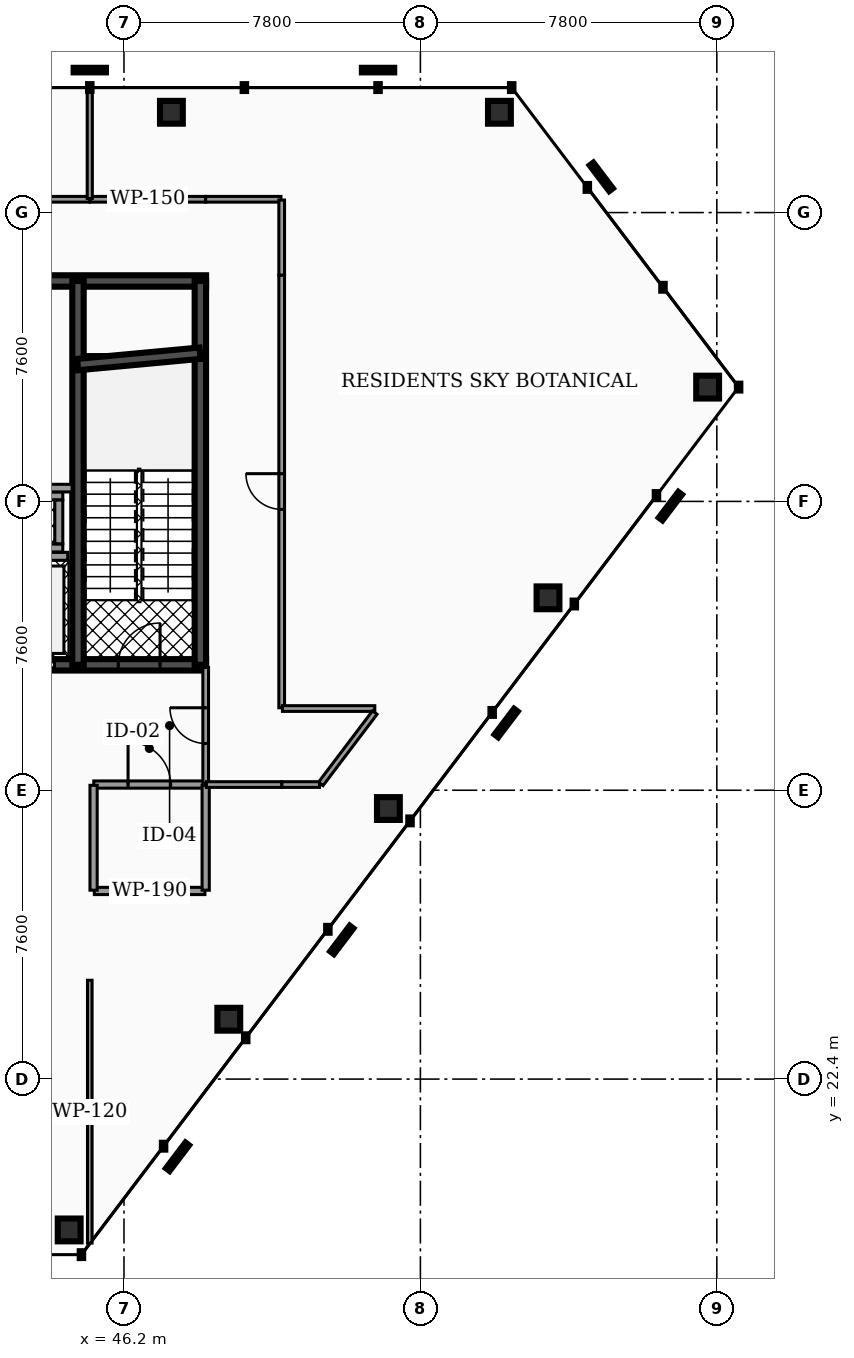
"""IFC4 building model, lengths in metres.
Left out: names, types, materials, properties, quantities, classifications, styles, units other than length and angle.
Written with IfcOpenShell. Run it as: python <this file> out.ifc"""

import sys

from ifc_helpers import new_model, si_unit, direction, frame, frame_2d, origin, origin_2d, place, context, subcontext, project, spatial, rectangle, hollow_rectangle, extrude, element, fill, save


model = new_model("IFC4")
c1 = context("Model", 3, precision=1e-05, world=origin(), true_north=direction((0.0, 1.0)))
c2 = subcontext(c1, "Body", "Model", "MODEL_VIEW")
j1 = project(units=[si_unit("LENGTHUNIT", "METRE"), si_unit("PLANEANGLEUNIT", "RADIAN")], contexts=[c1])
p1 = place(None, origin())
s1 = spatial("IfcSite", under=j1, at=p1, CompositionType="ELEMENT")
p2 = place(p1, origin())
s2 = spatial("IfcBuilding", under=s1, at=p2, CompositionType="ELEMENT")
p3 = place(p2, frame((0.0, 0.0, 204.34)))
s3 = spatial("IfcBuildingStorey", under=s2, at=p3, CompositionType="ELEMENT", Elevation=204.34)
p4 = place(p3, frame((28.5, 43.4, 0.0), z_axis=(0.0, 0.0, 1.0), x_axis=(1.0, 0.0, 0.0)))
e1 = element("IfcWall", 1, at=p4, inside=s3, PredefinedType="SHEAR", context=c2, shape_type="SweptSolid", body=[
    extrude(rectangle(XDim=19.86, YDim=0.3, at=frame_2d((9.93, 0.0))), origin(), (0.0, 0.0, 1.0), 4.2),
])
p5 = place(p3, frame((28.5, 33.3, 0.0), z_axis=(0.0, 0.0, 1.0), x_axis=(1.0, 0.0, 0.0)))
e2 = element("IfcWall", 2, at=p5, inside=s3, PredefinedType="SHEAR", context=c2, shape_type="SweptSolid", body=[
    extrude(rectangle(XDim=19.86, YDim=0.3, at=frame_2d((9.93, 0.0))), origin(), (0.0, 0.0, 1.0), 4.2),
])
p6 = place(p5, frame((3.93, 0.0, 0.0)))
e3 = element("IfcOpeningElement", 3, at=p6, cuts=e2, PredefinedType="OPENING", context=c2, shape_type="SweptSolid", body=[
    extrude(rectangle(XDim=1.1, YDim=2.15, at=frame_2d((0.55, 1.075))), frame((0.0, 0.16, 0.0), z_axis=(0.0, -1.0, 0.0), x_axis=(1.0, 0.0, 0.0)), (0.0, 0.0, 1.0), 0.32),
])
p7 = place(p5, frame((14.77, 0.0, 0.0)))
e4 = element("IfcOpeningElement", 4, at=p7, cuts=e2, PredefinedType="OPENING", context=c2, shape_type="SweptSolid", body=[
    extrude(rectangle(XDim=1.1, YDim=2.15, at=frame_2d((0.55, 1.075))), frame((0.0, 0.16, 0.0), z_axis=(0.0, -1.0, 0.0), x_axis=(1.0, 0.0, 0.0)), (0.0, 0.0, 1.0), 0.32),
])
p8 = place(p5, frame((11.25, 0.0, 0.0)))
e5 = element("IfcOpeningElement", 5, at=p8, cuts=e2, PredefinedType="OPENING", context=c2, shape_type="SweptSolid", body=[
    extrude(rectangle(XDim=1.0, YDim=2.1, at=frame_2d((0.5, 1.05))), frame((0.0, 0.16, 0.0), z_axis=(0.0, -1.0, 0.0), x_axis=(1.0, 0.0, 0.0)), (0.0, 0.0, 1.0), 0.32),
])
p9 = place(p5, frame((12.95, 0.0, 0.0)))
e6 = element("IfcOpeningElement", 6, at=p9, cuts=e2, PredefinedType="OPENING", context=c2, shape_type="SweptSolid", body=[
    extrude(rectangle(XDim=1.0, YDim=2.1, at=frame_2d((0.5, 1.05))), frame((0.0, 0.16, 0.0), z_axis=(0.0, -1.0, 0.0), x_axis=(1.0, 0.0, 0.0)), (0.0, 0.0, 1.0), 0.32),
])
p10 = place(p5, frame((5.85, 0.0, 0.0)))
e7 = element("IfcOpeningElement", 7, at=p10, cuts=e2, PredefinedType="OPENING", context=c2, shape_type="SweptSolid", body=[
    extrude(rectangle(XDim=1.0, YDim=2.1, at=frame_2d((0.5, 1.05))), frame((0.0, 0.16, 0.0), z_axis=(0.0, -1.0, 0.0), x_axis=(1.0, 0.0, 0.0)), (0.0, 0.0, 1.0), 0.32),
])
p11 = place(p5, frame((1.21, 0.0, 0.0)))
e8 = element("IfcOpeningElement", 8, at=p11, cuts=e2, PredefinedType="OPENING", context=c2, shape_type="SweptSolid", body=[
    extrude(rectangle(XDim=1.1, YDim=2.2, at=frame_2d((0.55, 1.1))), frame((0.0, 0.16, 0.0), z_axis=(0.0, -1.0, 0.0), x_axis=(1.0, 0.0, 0.0)), (0.0, 0.0, 1.0), 0.32),
])
p12 = place(p5, frame((9.34, 0.0, 0.0)))
e9 = element("IfcOpeningElement", 9, at=p12, cuts=e2, PredefinedType="OPENING", context=c2, shape_type="SweptSolid", body=[
    extrude(rectangle(XDim=1.12, YDim=2.05, at=frame_2d((0.56, 1.025))), frame((0.0, 0.16, 0.0), z_axis=(0.0, -1.0, 0.0), x_axis=(1.0, 0.0, 0.0)), (0.0, 0.0, 1.0), 0.32),
])
p13 = place(p5, frame((17.55, 0.0, 0.0)))
e10 = element("IfcOpeningElement", 10, at=p13, cuts=e2, PredefinedType="OPENING", context=c2, shape_type="SweptSolid", body=[
    extrude(rectangle(XDim=1.1, YDim=2.2, at=frame_2d((0.55, 1.1))), frame((0.0, 0.16, 0.0), z_axis=(0.0, -1.0, 0.0), x_axis=(1.0, 0.0, 0.0)), (0.0, 0.0, 1.0), 0.32),
])
for number, where, z_axis, x_axis in (
    (11, (44.99, 33.3, 0.0), (0.0, 0.0, 1.0), (0.0, 1.0, 0.0)),
    (12, (48.21, 33.3, 0.0), (0.0, 0.0, 1.0), (0.0, 1.0, 0.0)),
):
    element("IfcWall", number, at=place(p3, frame(where, z_axis=z_axis, x_axis=x_axis)), inside=s3, PredefinedType="SHEAR", context=c2, shape_type="SweptSolid", body=[
        extrude(rectangle(XDim=10.1, YDim=0.3, at=frame_2d((5.05, 0.0))), origin(), (0.0, 0.0, 1.0), 4.2),
    ])
p14 = place(p3, frame((44.98, 41.2, 0.0), z_axis=(0.0, 0.0, 1.0), x_axis=(0.995686468965, 0.09278176286, 0.0)))
e13 = element("IfcWall", 13, at=p14, inside=s3, PredefinedType="SHEAR", context=c2, shape_type="SweptSolid", body=[
    extrude(rectangle(XDim=3.234, YDim=0.3, at=frame_2d((1.617, 0.0))), origin(), (0.0, 0.0, 1.0), 4.2),
])
p15 = place(p3, frame((56.08, 47.839, 0.0), z_axis=(0.032993813129, -0.018588063734, 0.999282688823), x_axis=(0.490843733941, 0.871247627745, 0.0)))
e14 = element("IfcColumn", 14, at=p15, inside=s3, PredefinedType="COLUMN", context=c2, shape_type="SweptSolid", body=[
    extrude(hollow_rectangle(XDim=0.6, YDim=0.6, WallThickness=0.03, at=origin_2d()), origin(), (0.0, 0.0, 1.0), 4.203),
])
p16 = place(p3, frame((47.448, 47.839, 0.0), z_axis=(0.014760704561, -0.018596163226, 0.999718112427), x_axis=(0.783251064846, 0.621705532722, 0.0)))
e15 = element("IfcColumn", 15, at=p16, inside=s3, PredefinedType="COLUMN", context=c2, shape_type="SweptSolid", body=[
    extrude(hollow_rectangle(XDim=0.6, YDim=0.6, WallThickness=0.03, at=origin_2d()), origin(), (0.0, 0.0, 1.0), 4.201),
])
for number, where, z_axis, x_axis in (
    (16, (44.758, 18.431, 0.0), (-0.055, 0.031, 0.998), (-0.489, -0.872, 0.0)),
    (17, (48.958, 23.975, 0.0), (-0.049, 0.039, 0.998), (-0.627, -0.779, 0.0)),
):
    element("IfcColumn", number, at=place(p3, frame(where, z_axis=z_axis, x_axis=x_axis)), inside=s3, PredefinedType="COLUMN", context=c2, shape_type="SweptSolid", body=[
        extrude(hollow_rectangle(XDim=0.6, YDim=0.6, WallThickness=0.03, at=origin_2d()), origin(), (0.0, 0.0, 1.0), 4.208),
    ])
p17 = place(p3, frame((53.158, 29.519, 0.0), z_axis=(-0.042348426679, 0.047511454041, 0.997972581033), x_axis=(-0.746503429417, -0.665381567124, 0.0)))
e18 = element("IfcColumn", 18, at=p17, inside=s3, PredefinedType="COLUMN", context=c2, shape_type="SweptSolid", body=[
    extrude(hollow_rectangle(XDim=0.6, YDim=0.6, WallThickness=0.03, at=origin_2d()), origin(), (0.0, 0.0, 1.0), 4.208),
])
p18 = place(p3, frame((57.358, 35.063, 0.0), z_axis=(-0.03601854171, 0.055854840043, 0.997789006502), x_axis=(-0.840412048992, -0.541947956827, 0.0)))
e19 = element("IfcColumn", 19, at=p18, inside=s3, PredefinedType="COLUMN", context=c2, shape_type="SweptSolid", body=[
    extrude(hollow_rectangle(XDim=0.6, YDim=0.6, WallThickness=0.03, at=origin_2d()), origin(), (0.0, 0.0, 1.0), 4.209),
])
p19 = place(p3, frame((61.558, 40.607, 0.0), z_axis=(-0.029745662477, 0.064188008504, 0.99749440857), x_axis=(-0.907310606534, -0.420461012784, 0.0)))
e20 = element("IfcColumn", 20, at=p19, inside=s3, PredefinedType="COLUMN", context=c2, shape_type="SweptSolid", body=[
    extrude(hollow_rectangle(XDim=0.6, YDim=0.6, WallThickness=0.03, at=origin_2d()), origin(), (0.0, 0.0, 1.0), 4.21),
])
p20 = place(p3, frame((42.92, 36.155, 0.0), z_axis=(0.0, 0.0, 1.0), x_axis=(1.0, 0.0, 0.0)))
e21 = element("IfcWall", 21, at=p20, inside=s3, PredefinedType="SOLIDWALL", context=c2, shape_type="SweptSolid", body=[
    extrude(rectangle(XDim=1.8, YDim=0.21, at=frame_2d((0.9, 0.0))), origin(), (0.0, 0.0, 1.0), 3.172),
])
for number, where, z_axis, x_axis in (
    (22, (42.99, 36.375, 0.0), (0.0, 0.0, 1.0), (1.0, 0.0, 0.0)),
    (23, (42.99, 37.745, 0.0), (0.0, 0.0, 1.0), (1.0, 0.0, 0.0)),
):
    element("IfcWall", number, at=place(p3, frame(where, z_axis=z_axis, x_axis=x_axis)), inside=s3, PredefinedType="SOLIDWALL", context=c2, shape_type="SweptSolid", body=[
        extrude(rectangle(XDim=1.6, YDim=0.21, at=frame_2d((0.8, 0.0))), origin(), (0.0, 0.0, 1.0), 4.2),
    ])
p21 = place(p3, frame((44.485, 36.485, 0.0), z_axis=(0.0, 0.0, 1.0), x_axis=(0.0, 1.0, 0.0)))
e24 = element("IfcWall", 24, at=p21, inside=s3, PredefinedType="SOLIDWALL", context=c2, shape_type="SweptSolid", body=[
    extrude(rectangle(XDim=1.15, YDim=0.21, at=frame_2d((0.575, 0.0))), origin(), (0.0, 0.0, 1.0), 4.2),
])
p22 = place(p3, frame((41.22, 37.95, 0.0), z_axis=(0.0, 0.0, 1.0), x_axis=(1.0, 0.0, 0.0)))
e25 = element("IfcWall", 25, at=p22, inside=s3, PredefinedType="PARTITIONING", context=c2, shape_type="SweptSolid", body=[
    extrude(rectangle(XDim=3.615, YDim=0.2, at=frame_2d((1.808, 0.0))), origin(), (0.0, 0.0, 1.0), 3.157),
])
p23 = place(p3, frame((45.405, 30.15, 0.0), z_axis=(0.0, 0.0, 1.0), x_axis=(1.0, 0.0, 0.0)))
e26 = element("IfcWall", 26, at=p23, inside=s3, PredefinedType="PARTITIONING", context=c2, shape_type="SweptSolid", body=[
    extrude(rectangle(XDim=2.925, YDim=0.19, at=frame_2d((1.462, 0.0))), origin(), (0.0, 0.0, 1.0), 3.157),
])
p24 = place(p23, frame((0.903, 0.0, 0.0)))
e27 = element("IfcOpeningElement", 27, at=p24, cuts=e26, PredefinedType="OPENING", context=c2, shape_type="SweptSolid", body=[
    extrude(rectangle(XDim=1.12, YDim=2.05, at=frame_2d((0.56, 1.025))), frame((0.0, 0.105, 0.0), z_axis=(0.0, -1.0, 0.0), x_axis=(1.0, 0.0, 0.0)), (0.0, 0.0, 1.0), 0.21),
])
p25 = place(p3, frame((48.35, 30.17, 0.0), z_axis=(0.0, 0.0, 1.0), x_axis=(0.0, 1.0, 0.0)))
e28 = element("IfcWall", 28, at=p25, inside=s3, PredefinedType="PARTITIONING", context=c2, shape_type="SweptSolid", body=[
    extrude(rectangle(XDim=3.06, YDim=0.15, at=frame_2d((1.53, 0.0))), origin(), (0.0, 0.0, 1.0), 3.157),
])
p26 = place(p25, frame((1.06, 0.0, 0.0)))
e29 = element("IfcOpeningElement", 29, at=p26, cuts=e28, PredefinedType="OPENING", context=c2, shape_type="SweptSolid", body=[
    extrude(rectangle(XDim=0.94, YDim=2.05, at=frame_2d((0.47, 1.025))), frame((0.0, 0.085, 0.0), z_axis=(0.0, -1.0, 0.0), x_axis=(1.0, 0.0, 0.0)), (0.0, 0.0, 1.0), 0.17),
])
p27 = place(p3, frame((45.42, 27.35, 0.0), z_axis=(0.0, 0.0, 1.0), x_axis=(1.0, 0.0, 0.0)))
e30 = element("IfcWall", 30, at=p27, inside=s3, PredefinedType="PARTITIONING", context=c2, shape_type="SweptSolid", body=[
    extrude(rectangle(XDim=2.91, YDim=0.19, at=frame_2d((1.455, 0.0))), origin(), (0.0, 0.0, 1.0), 3.157),
])
for number, where, z_axis, x_axis in (
    (31, (45.4, 27.37, 0.0), (0.0, 0.0, 1.0), (0.0, 1.0, 0.0)),
    (32, (48.35, 27.37, 0.0), (0.0, 0.0, 1.0), (0.0, 1.0, 0.0)),
):
    element("IfcWall", number, at=place(p3, frame(where, z_axis=z_axis, x_axis=x_axis)), inside=s3, PredefinedType="PARTITIONING", context=c2, shape_type="SweptSolid", body=[
        extrude(rectangle(XDim=2.76, YDim=0.19, at=frame_2d((1.38, 0.0))), origin(), (0.0, 0.0, 1.0), 3.157),
    ])
p28 = place(p3, frame((45.305, 45.55, 0.0), z_axis=(0.0, 0.0, 1.0), x_axis=(1.0, 0.0, 0.0)))
e33 = element("IfcWall", 33, at=p28, inside=s3, PredefinedType="PARTITIONING", context=c2, shape_type="SweptSolid", body=[
    extrude(rectangle(XDim=3.045, YDim=0.15, at=frame_2d((1.522, 0.0))), origin(), (0.0, 0.0, 1.0), 3.157),
])
for number, where, z_axis, x_axis in (
    (34, (48.35, 45.55, 0.0), (0.0, 0.0, 1.0), (1.0, 0.0, 0.0)),
    (35, (50.35, 43.55, 0.0), (0.0, 0.0, 1.0), (0.0, 1.0, 0.0)),
):
    element("IfcWall", number, at=place(p3, frame(where, z_axis=z_axis, x_axis=x_axis)), inside=s3, PredefinedType="PARTITIONING", context=c2, shape_type="SweptSolid", body=[
        extrude(rectangle(XDim=1.98, YDim=0.15, at=frame_2d((0.99, 0.0))), origin(), (0.0, 0.0, 1.0), 3.157),
    ])
p29 = place(p3, frame((50.35, 32.17, 0.0), z_axis=(0.0, 0.0, 1.0), x_axis=(0.0, 1.0, 0.0)))
e36 = element("IfcWall", 36, at=p29, inside=s3, PredefinedType="PARTITIONING", context=c2, shape_type="SweptSolid", body=[
    extrude(rectangle(XDim=11.38, YDim=0.15, at=frame_2d((5.69, 0.0))), origin(), (0.0, 0.0, 1.0), 3.157),
])
p30 = place(p29, frame((5.22, 0.0, 0.0)))
e37 = element("IfcOpeningElement", 37, at=p30, cuts=e36, PredefinedType="OPENING", context=c2, shape_type="SweptSolid", body=[
    extrude(rectangle(XDim=0.94, YDim=2.05, at=frame_2d((0.47, 1.025))), frame((0.0, 0.085, 0.0), z_axis=(0.0, -1.0, 0.0), x_axis=(1.0, 0.0, 0.0)), (0.0, 0.0, 1.0), 0.17),
])
p31 = place(p3, frame((50.37, 32.15, 0.0), z_axis=(0.0, 0.0, 1.0), x_axis=(1.0, 0.0, 0.0)))
e38 = element("IfcWall", 38, at=p31, inside=s3, PredefinedType="PARTITIONING", context=c2, shape_type="SweptSolid", body=[
    extrude(rectangle(XDim=2.43, YDim=0.15, at=frame_2d((1.215, 0.0))), origin(), (0.0, 0.0, 1.0), 3.157),
])
p32 = place(p3, frame((51.377, 30.166, 0.0), z_axis=(0.0, 0.0, 1.0), x_axis=(0.603855693114, 0.797093659424, 0.0)))
e39 = element("IfcWall", 39, at=p32, inside=s3, PredefinedType="PARTITIONING", context=c2, shape_type="SweptSolid", body=[
    extrude(rectangle(XDim=2.356, YDim=0.15, at=frame_2d((1.178, 0.0))), origin(), (0.0, 0.0, 1.0), 3.157),
])
p33 = place(p3, frame((50.35, 30.15, 0.0), z_axis=(0.0, 0.0, 1.0), x_axis=(1.0, 0.0, 0.0)))
e40 = element("IfcWall", 40, at=p33, inside=s3, PredefinedType="PARTITIONING", context=c2, shape_type="SweptSolid", body=[
    extrude(rectangle(XDim=0.995, YDim=0.15, at=frame_2d((0.498, 0.0))), origin(), (0.0, 0.0, 1.0), 3.157),
])
p34 = place(p3, frame((48.37, 30.15, 0.0), z_axis=(0.0, 0.0, 1.0), x_axis=(1.0, 0.0, 0.0)))
e41 = element("IfcWall", 41, at=p34, inside=s3, PredefinedType="PARTITIONING", context=c2, shape_type="SweptSolid", body=[
    extrude(rectangle(XDim=1.98, YDim=0.15, at=frame_2d((0.99, 0.0))), origin(), (0.0, 0.0, 1.0), 3.157),
])
p35 = place(p3, frame((37.384, 45.55, 0.0), z_axis=(0.0, 0.0, 1.0), x_axis=(1.0, 0.0, 0.0)))
e42 = element("IfcWall", 42, at=p35, inside=s3, PredefinedType="PARTITIONING", context=c2, shape_type="SweptSolid", body=[
    extrude(rectangle(XDim=7.911, YDim=0.15, at=frame_2d((3.956, 0.0))), origin(), (0.0, 0.0, 1.0), 3.157),
])
p36 = place(p3, frame((45.3, 18.085, 0.0), z_axis=(0.0, 0.0, 1.0), x_axis=(0.0, 1.0, 0.0)))
e43 = element("IfcWall", 43, at=p36, inside=s3, PredefinedType="PARTITIONING", context=c2, shape_type="SweptSolid", body=[
    extrude(rectangle(XDim=6.915, YDim=0.12, at=frame_2d((3.458, 0.0))), origin(), (0.0, 0.0, 1.0), 3.157),
])
p37 = place(p3, frame((45.3, 45.57, 0.0), z_axis=(0.0, 0.0, 1.0), x_axis=(0.0, 1.0, 0.0)))
e44 = element("IfcWall", 44, at=p37, inside=s3, PredefinedType="PARTITIONING", context=c2, shape_type="SweptSolid", body=[
    extrude(rectangle(XDim=2.904, YDim=0.135, at=frame_2d((1.452, 0.0))), origin(), (0.0, 0.0, 1.0), 3.157),
])
p38 = place(p7, origin())
e45 = element("IfcDoor", 45, at=p38, inside=s3, OperationType="SLIDING_TO_RIGHT", PredefinedType="DOOR", context=c2, shape_type="SweptSolid", body=[
    extrude(rectangle(XDim=1.1, YDim=2.15, at=frame_2d((0.55, 1.075))), frame((0.0, 0.025, 0.0), z_axis=(0.0, -1.0, 0.0), x_axis=(1.0, 0.0, 0.0)), (0.0, 0.0, 1.0), 0.05),
])
fill(e4, e45)
p39 = place(p13, origin())
e46 = element("IfcDoor", 46, at=p39, inside=s3, OperationType="SINGLE_SWING_RIGHT", PredefinedType="DOOR", context=c2, shape_type="SweptSolid", body=[
    extrude(rectangle(XDim=1.1, YDim=2.2, at=frame_2d((0.55, 1.1))), frame((0.0, 0.025, 0.0), z_axis=(0.0, -1.0, 0.0), x_axis=(1.0, 0.0, 0.0)), (0.0, 0.0, 1.0), 0.05),
])
fill(e10, e46)
p40 = place(p24, origin())
e47 = element("IfcDoor", 47, at=p40, inside=s3, OperationType="SINGLE_SWING_LEFT", PredefinedType="DOOR", context=c2, shape_type="SweptSolid", body=[
    extrude(rectangle(XDim=1.12, YDim=2.05, at=frame_2d((0.56, 1.025))), frame((0.0, 0.025, 0.0), z_axis=(0.0, -1.0, 0.0), x_axis=(1.0, 0.0, 0.0)), (0.0, 0.0, 1.0), 0.05),
])
fill(e27, e47)
p41 = place(p26, origin())
e48 = element("IfcDoor", 48, at=p41, inside=s3, OperationType="SINGLE_SWING_RIGHT", PredefinedType="DOOR", context=c2, shape_type="SweptSolid", body=[
    extrude(rectangle(XDim=0.94, YDim=2.05, at=frame_2d((0.47, 1.025))), frame((0.0, 0.025, 0.0), z_axis=(0.0, -1.0, 0.0), x_axis=(1.0, 0.0, 0.0)), (0.0, 0.0, 1.0), 0.05),
])
fill(e29, e48)
p42 = place(p30, origin())
e49 = element("IfcDoor", 49, at=p42, inside=s3, OperationType="SINGLE_SWING_RIGHT", PredefinedType="DOOR", context=c2, shape_type="SweptSolid", body=[
    extrude(rectangle(XDim=0.94, YDim=2.05, at=frame_2d((0.47, 1.025))), frame((0.0, 0.025, 0.0), z_axis=(0.0, -1.0, 0.0), x_axis=(1.0, 0.0, 0.0)), (0.0, 0.0, 1.0), 0.05),
])
fill(e37, e49)
save(model, sys.argv[1])
